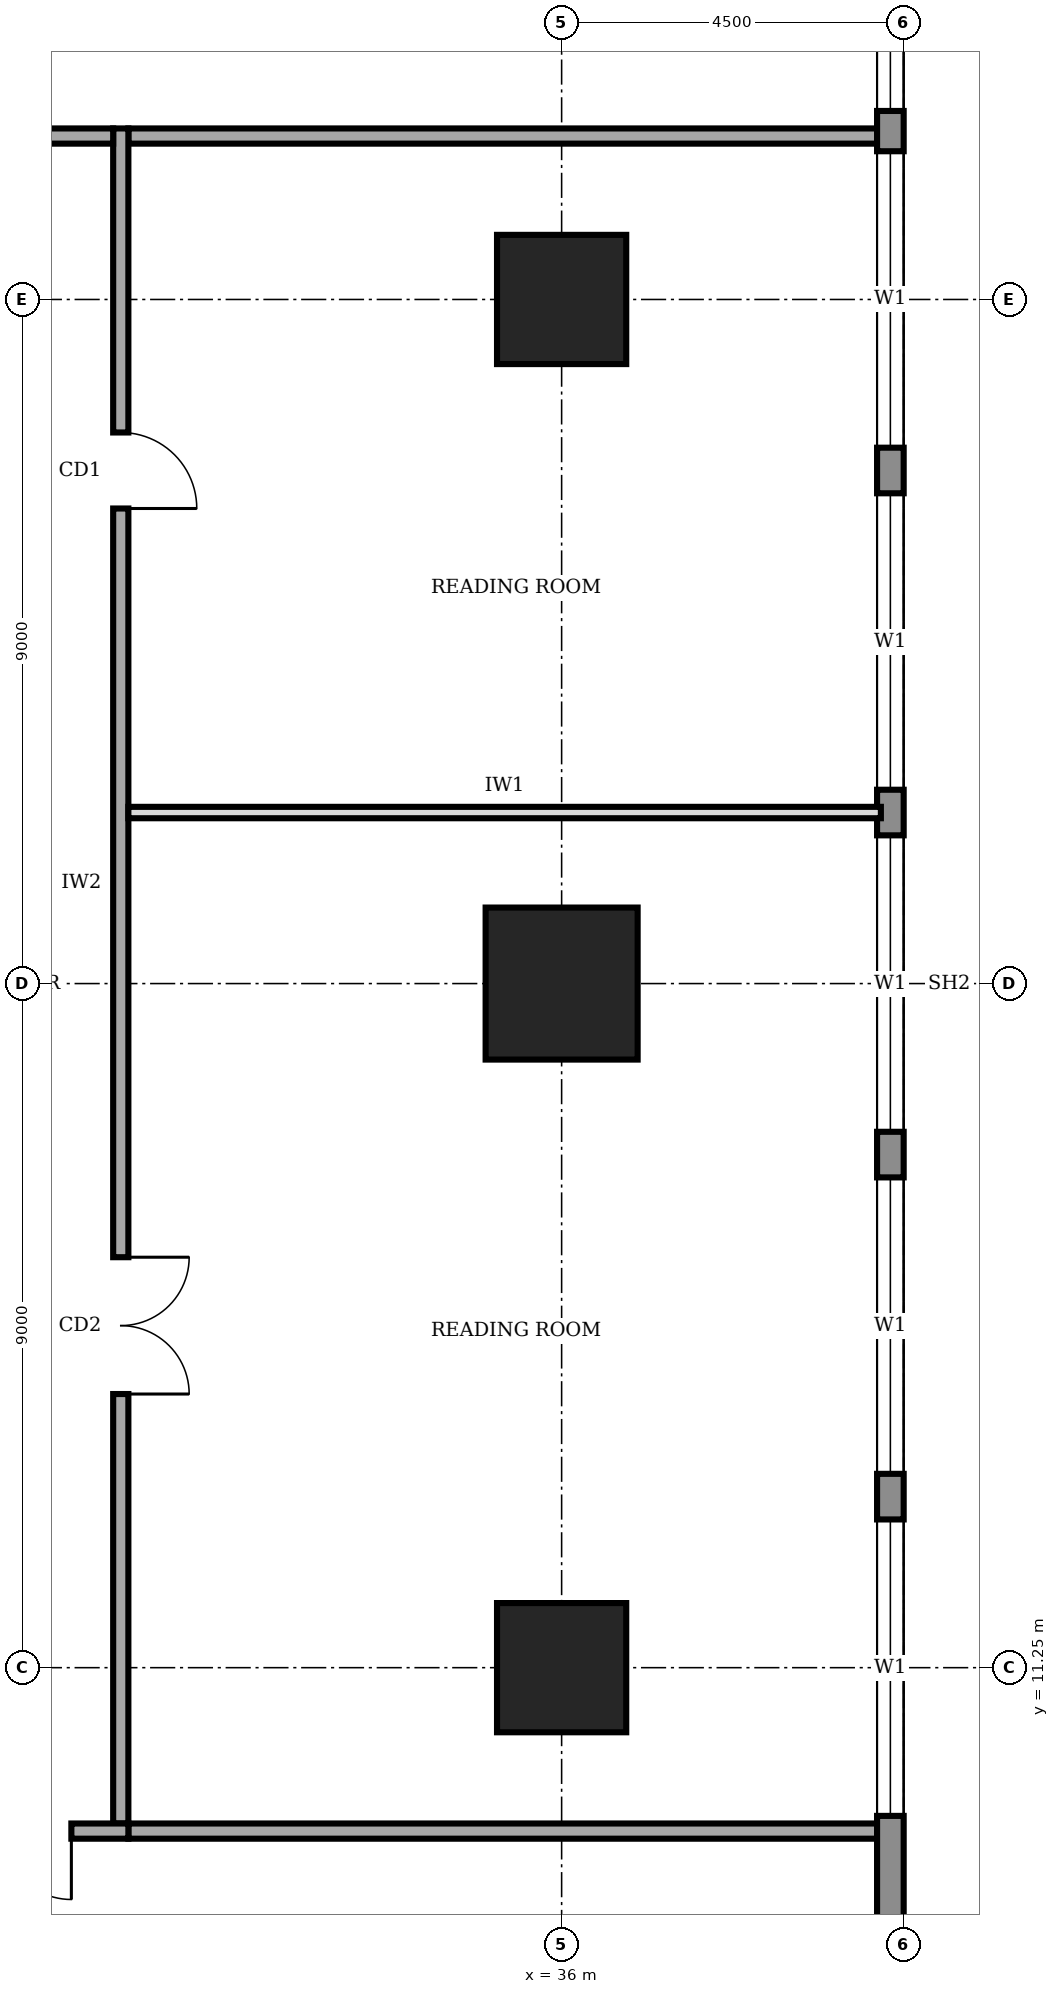
"""IFC4 building model, lengths in metres.
Left out: names, types, materials, properties, quantities, classifications, styles, units other than length and angle.
Written with IfcOpenShell. Run it as: python <this file> out.ifc"""

import sys

from ifc_helpers import new_model, si_unit, direction, frame, frame_2d, origin, origin_2d, place, context, subcontext, project, spatial, rectangle, extrude, element, fill, save


model = new_model("IFC4")
c1 = context("Model", 3, precision=1e-05, world=origin(), true_north=direction((0.0, 1.0)))
c2 = subcontext(c1, "Body", "Model", "MODEL_VIEW")
j1 = project(units=[si_unit("LENGTHUNIT", "METRE"), si_unit("PLANEANGLEUNIT", "RADIAN")], contexts=[c1])
p1 = place(None, origin())
s1 = spatial("IfcSite", under=j1, at=p1, CompositionType="ELEMENT")
p2 = place(p1, origin())
s2 = spatial("IfcBuilding", under=s1, at=p2, CompositionType="ELEMENT")
p3 = place(p2, frame((0.0, 0.0, 285.0)))
s3 = spatial("IfcBuildingStorey", under=s2, at=p3, CompositionType="ELEMENT", Elevation=285.0)
p4 = place(p3, frame((36.0, 11.25, 0.0), z_axis=(0.0, 0.0, 1.0), x_axis=(1.0, 0.0, 0.0)))
e1 = element("IfcColumn", 1, at=p4, inside=s3, PredefinedType="COLUMN", context=c2, shape_type="SweptSolid", body=[
    extrude(rectangle(XDim=1.7, YDim=1.7, at=origin_2d()), origin(), (0.0, 0.0, 1.0), 4.0),
])
p5 = place(p3, frame((36.0, 20.25, 0.0), z_axis=(0.0, 0.0, 1.0), x_axis=(1.0, 0.0, 0.0)))
e2 = element("IfcColumn", 2, at=p5, inside=s3, PredefinedType="COLUMN", context=c2, shape_type="SweptSolid", body=[
    extrude(rectangle(XDim=2.0, YDim=2.0, at=origin_2d()), origin(), (0.0, 0.0, 1.0), 4.0),
])
p6 = place(p3, frame((36.0, 29.25, 0.0), z_axis=(0.0, 0.0, 1.0), x_axis=(1.0, 0.0, 0.0)))
e3 = element("IfcColumn", 3, at=p6, inside=s3, PredefinedType="COLUMN", context=c2, shape_type="SweptSolid", body=[
    extrude(rectangle(XDim=1.7, YDim=1.7, at=origin_2d()), origin(), (0.0, 0.0, 1.0), 4.0),
])
p7 = place(p3, frame((40.325, 4.52, 0.0), z_axis=(0.0, 0.0, 1.0), x_axis=(0.0, 1.0, 0.0)))
e4 = element("IfcWall", 4, at=p7, inside=s3, PredefinedType="STANDARD", context=c2, shape_type="SweptSolid", body=[
    extrude(rectangle(XDim=31.46, YDim=0.35, at=frame_2d((15.73, 0.0))), origin(), (0.0, 0.0, 1.0), 3.75),
])
p8 = place(p7, frame((4.78, 0.0, 0.9)))
e5 = element("IfcOpeningElement", 5, at=p8, cuts=e4, PredefinedType="OPENING", context=c2, shape_type="SweptSolid", body=[
    extrude(rectangle(XDim=3.9, YDim=2.2, at=frame_2d((1.95, 1.1))), frame((0.0, 0.185, 0.0), z_axis=(0.0, -1.0, 0.0), x_axis=(1.0, 0.0, 0.0)), (0.0, 0.0, 1.0), 0.37),
])
p9 = place(p7, frame((9.28, 0.0, 0.9)))
e6 = element("IfcOpeningElement", 6, at=p9, cuts=e4, PredefinedType="OPENING", context=c2, shape_type="SweptSolid", body=[
    extrude(rectangle(XDim=3.9, YDim=2.2, at=frame_2d((1.95, 1.1))), frame((0.0, 0.185, 0.0), z_axis=(0.0, -1.0, 0.0), x_axis=(1.0, 0.0, 0.0)), (0.0, 0.0, 1.0), 0.37),
])
p10 = place(p7, frame((13.78, 0.0, 0.9)))
e7 = element("IfcOpeningElement", 7, at=p10, cuts=e4, PredefinedType="OPENING", context=c2, shape_type="SweptSolid", body=[
    extrude(rectangle(XDim=3.9, YDim=2.2, at=frame_2d((1.95, 1.1))), frame((0.0, 0.185, 0.0), z_axis=(0.0, -1.0, 0.0), x_axis=(1.0, 0.0, 0.0)), (0.0, 0.0, 1.0), 0.37),
])
p11 = place(p7, frame((18.28, 0.0, 0.9)))
e8 = element("IfcOpeningElement", 8, at=p11, cuts=e4, PredefinedType="OPENING", context=c2, shape_type="SweptSolid", body=[
    extrude(rectangle(XDim=3.9, YDim=2.2, at=frame_2d((1.95, 1.1))), frame((0.0, 0.185, 0.0), z_axis=(0.0, -1.0, 0.0), x_axis=(1.0, 0.0, 0.0)), (0.0, 0.0, 1.0), 0.37),
])
p12 = place(p7, frame((22.78, 0.0, 0.9)))
e9 = element("IfcOpeningElement", 9, at=p12, cuts=e4, PredefinedType="OPENING", context=c2, shape_type="SweptSolid", body=[
    extrude(rectangle(XDim=3.9, YDim=2.2, at=frame_2d((1.95, 1.1))), frame((0.0, 0.185, 0.0), z_axis=(0.0, -1.0, 0.0), x_axis=(1.0, 0.0, 0.0)), (0.0, 0.0, 1.0), 0.37),
])
p13 = place(p7, frame((27.21, 0.0, 0.9)))
e10 = element("IfcOpeningElement", 10, at=p13, cuts=e4, PredefinedType="OPENING", context=c2, shape_type="SweptSolid", body=[
    extrude(rectangle(XDim=3.9, YDim=2.2, at=frame_2d((1.95, 1.1))), frame((0.0, 0.185, 0.0), z_axis=(0.0, -1.0, 0.0), x_axis=(1.0, 0.0, 0.0)), (0.0, 0.0, 1.0), 0.37),
])
p14 = place(p3, frame((11.9, 9.1, 0.0), z_axis=(0.0, 0.0, 1.0), x_axis=(1.0, 0.0, 0.0)))
e11 = element("IfcWall", 11, at=p14, inside=s3, PredefinedType="SOLIDWALL", context=c2, shape_type="SweptSolid", body=[
    extrude(rectangle(XDim=18.4, YDim=0.2, at=frame_2d((9.2, 0.0))), origin(), (0.0, 0.0, 1.0), 3.75),
])
p15 = place(p14, frame((6.55, 0.0, 0.0)))
e12 = element("IfcOpeningElement", 12, at=p15, cuts=e11, PredefinedType="OPENING", context=c2, shape_type="SweptSolid", body=[
    extrude(rectangle(XDim=1.8, YDim=2.1, at=frame_2d((0.9, 1.05))), frame((0.0, 0.11, 0.0), z_axis=(0.0, -1.0, 0.0), x_axis=(1.0, 0.0, 0.0)), (0.0, 0.0, 1.0), 0.22),
])
p16 = place(p14, frame((15.85, 0.0, 0.0)))
e13 = element("IfcOpeningElement", 13, at=p16, cuts=e11, PredefinedType="OPENING", context=c2, shape_type="SweptSolid", body=[
    extrude(rectangle(XDim=1.8, YDim=2.1, at=frame_2d((0.9, 1.05))), frame((0.0, 0.11, 0.0), z_axis=(0.0, -1.0, 0.0), x_axis=(1.0, 0.0, 0.0)), (0.0, 0.0, 1.0), 0.22),
])
p17 = place(p3, frame((30.2, 9.2, 0.0), z_axis=(0.0, 0.0, 1.0), x_axis=(0.0, 1.0, 0.0)))
e14 = element("IfcWall", 14, at=p17, inside=s3, PredefinedType="SOLIDWALL", context=c2, shape_type="SweptSolid", body=[
    extrude(rectangle(XDim=22.3, YDim=0.2, at=frame_2d((11.15, 0.0))), origin(), (0.0, 0.0, 1.0), 3.75),
])
p18 = place(p17, frame((5.65, 0.0, 0.0)))
e15 = element("IfcOpeningElement", 15, at=p18, cuts=e14, PredefinedType="OPENING", context=c2, shape_type="SweptSolid", body=[
    extrude(rectangle(XDim=1.8, YDim=2.1, at=frame_2d((0.9, 1.05))), frame((0.0, 0.11, 0.0), z_axis=(0.0, -1.0, 0.0), x_axis=(1.0, 0.0, 0.0)), (0.0, 0.0, 1.0), 0.22),
])
p19 = place(p17, frame((17.3, 0.0, 0.0)))
e16 = element("IfcOpeningElement", 16, at=p19, cuts=e14, PredefinedType="OPENING", context=c2, shape_type="SweptSolid", body=[
    extrude(rectangle(XDim=1.0, YDim=2.1, at=frame_2d((0.5, 1.05))), frame((0.0, 0.11, 0.0), z_axis=(0.0, -1.0, 0.0), x_axis=(1.0, 0.0, 0.0)), (0.0, 0.0, 1.0), 0.22),
])
p20 = place(p3, frame((30.1, 31.4, 0.0), z_axis=(0.0, 0.0, 1.0), x_axis=(-1.0, 0.0, 0.0)))
e17 = element("IfcWall", 17, at=p20, inside=s3, PredefinedType="SOLIDWALL", context=c2, shape_type="SweptSolid", body=[
    extrude(rectangle(XDim=18.4, YDim=0.2, at=frame_2d((9.2, 0.0))), origin(), (0.0, 0.0, 1.0), 3.75),
])
p21 = place(p20, frame((14.35, 0.0, 0.0)))
e18 = element("IfcOpeningElement", 18, at=p21, cuts=e17, PredefinedType="OPENING", context=c2, shape_type="SweptSolid", body=[
    extrude(rectangle(XDim=1.8, YDim=2.1, at=frame_2d((0.9, 1.05))), frame((0.0, 0.11, 0.0), z_axis=(0.0, -1.0, 0.0), x_axis=(1.0, 0.0, 0.0)), (0.0, 0.0, 1.0), 0.22),
])
p22 = place(p20, frame((9.35, 0.0, 0.0)))
e19 = element("IfcOpeningElement", 19, at=p22, cuts=e17, PredefinedType="OPENING", context=c2, shape_type="SweptSolid", body=[
    extrude(rectangle(XDim=1.0, YDim=2.1, at=frame_2d((0.5, 1.05))), frame((0.0, 0.11, 0.0), z_axis=(0.0, -1.0, 0.0), x_axis=(1.0, 0.0, 0.0)), (0.0, 0.0, 1.0), 0.22),
])
p23 = place(p20, frame((2.8, 0.0, 0.0)))
e20 = element("IfcOpeningElement", 20, at=p23, cuts=e17, PredefinedType="OPENING", context=c2, shape_type="SweptSolid", body=[
    extrude(rectangle(XDim=1.8, YDim=2.1, at=frame_2d((0.9, 1.05))), frame((0.0, 0.11, 0.0), z_axis=(0.0, -1.0, 0.0), x_axis=(1.0, 0.0, 0.0)), (0.0, 0.0, 1.0), 0.22),
])
for number, where, z_axis, x_axis in (
    (21, (30.3, 9.1, 0.0), (0.0, 0.0, 1.0), (1.0, 0.0, 0.0)),
    (22, (30.3, 31.4, 0.0), (0.0, 0.0, 1.0), (1.0, 0.0, 0.0)),
):
    element("IfcWall", number, at=place(p3, frame(where, z_axis=z_axis, x_axis=x_axis)), inside=s3, PredefinedType="SOLIDWALL", context=c2, shape_type="SweptSolid", body=[
        extrude(rectangle(XDim=9.9, YDim=0.2, at=frame_2d((4.95, 0.0))), origin(), (0.0, 0.0, 1.0), 3.75),
    ])
p24 = place(p3, frame((30.3, 22.5, 0.0), z_axis=(0.0, 0.0, 1.0), x_axis=(1.0, 0.0, 0.0)))
e23 = element("IfcWall", 23, at=p24, inside=s3, PredefinedType="PARTITIONING", context=c2, shape_type="SweptSolid", body=[
    extrude(rectangle(XDim=9.9, YDim=0.15, at=frame_2d((4.95, 0.0))), origin(), (0.0, 0.0, 1.0), 3.75),
])
p25 = place(p8, origin())
e24 = element("IfcWindow", 24, at=p25, inside=s3, PartitioningType="SINGLE_PANEL", PredefinedType="WINDOW", context=c2, shape_type="SweptSolid", body=[
    extrude(rectangle(XDim=3.9, YDim=2.2, at=frame_2d((1.95, 1.1))), frame((0.0, 0.03, 0.0), z_axis=(0.0, -1.0, 0.0), x_axis=(1.0, 0.0, 0.0)), (0.0, 0.0, 1.0), 0.06),
])
fill(e5, e24)
p26 = place(p9, origin())
e25 = element("IfcWindow", 25, at=p26, inside=s3, PartitioningType="SINGLE_PANEL", PredefinedType="WINDOW", context=c2, shape_type="SweptSolid", body=[
    extrude(rectangle(XDim=3.9, YDim=2.2, at=frame_2d((1.95, 1.1))), frame((0.0, 0.03, 0.0), z_axis=(0.0, -1.0, 0.0), x_axis=(1.0, 0.0, 0.0)), (0.0, 0.0, 1.0), 0.06),
])
fill(e6, e25)
p27 = place(p10, origin())
e26 = element("IfcWindow", 26, at=p27, inside=s3, PartitioningType="SINGLE_PANEL", PredefinedType="WINDOW", context=c2, shape_type="SweptSolid", body=[
    extrude(rectangle(XDim=3.9, YDim=2.2, at=frame_2d((1.95, 1.1))), frame((0.0, 0.03, 0.0), z_axis=(0.0, -1.0, 0.0), x_axis=(1.0, 0.0, 0.0)), (0.0, 0.0, 1.0), 0.06),
])
fill(e7, e26)
p28 = place(p11, origin())
e27 = element("IfcWindow", 27, at=p28, inside=s3, PartitioningType="SINGLE_PANEL", PredefinedType="WINDOW", context=c2, shape_type="SweptSolid", body=[
    extrude(rectangle(XDim=3.9, YDim=2.2, at=frame_2d((1.95, 1.1))), frame((0.0, 0.03, 0.0), z_axis=(0.0, -1.0, 0.0), x_axis=(1.0, 0.0, 0.0)), (0.0, 0.0, 1.0), 0.06),
])
fill(e8, e27)
p29 = place(p12, origin())
e28 = element("IfcWindow", 28, at=p29, inside=s3, PartitioningType="SINGLE_PANEL", PredefinedType="WINDOW", context=c2, shape_type="SweptSolid", body=[
    extrude(rectangle(XDim=3.9, YDim=2.2, at=frame_2d((1.95, 1.1))), frame((0.0, 0.03, 0.0), z_axis=(0.0, -1.0, 0.0), x_axis=(1.0, 0.0, 0.0)), (0.0, 0.0, 1.0), 0.06),
])
fill(e9, e28)
p30 = place(p13, origin())
e29 = element("IfcWindow", 29, at=p30, inside=s3, PartitioningType="SINGLE_PANEL", PredefinedType="WINDOW", context=c2, shape_type="SweptSolid", body=[
    extrude(rectangle(XDim=3.9, YDim=2.2, at=frame_2d((1.95, 1.1))), frame((0.0, 0.03, 0.0), z_axis=(0.0, -1.0, 0.0), x_axis=(1.0, 0.0, 0.0)), (0.0, 0.0, 1.0), 0.06),
])
fill(e10, e29)
p31 = place(p16, frame((1.8, 0.0, 0.0), z_axis=(0.0, 0.0, 1.0), x_axis=(-1.0, 0.0, 0.0)))
e30 = element("IfcDoor", 30, at=p31, inside=s3, OperationType="DOUBLE_DOOR_SINGLE_SWING", PredefinedType="DOOR", context=c2, shape_type="SweptSolid", body=[
    extrude(rectangle(XDim=1.8, YDim=2.1, at=frame_2d((0.9, 1.05))), frame((0.0, 0.025, 0.0), z_axis=(0.0, -1.0, 0.0), x_axis=(1.0, 0.0, 0.0)), (0.0, 0.0, 1.0), 0.05),
])
fill(e13, e30)
p32 = place(p18, frame((1.8, 0.0, 0.0), z_axis=(0.0, 0.0, 1.0), x_axis=(-1.0, 0.0, 0.0)))
e31 = element("IfcDoor", 31, at=p32, inside=s3, OperationType="DOUBLE_DOOR_SINGLE_SWING", PredefinedType="DOOR", context=c2, shape_type="SweptSolid", body=[
    extrude(rectangle(XDim=1.8, YDim=2.1, at=frame_2d((0.9, 1.05))), frame((0.0, 0.025, 0.0), z_axis=(0.0, -1.0, 0.0), x_axis=(1.0, 0.0, 0.0)), (0.0, 0.0, 1.0), 0.05),
])
fill(e15, e31)
p33 = place(p19, frame((1.0, 0.0, 0.0), z_axis=(0.0, 0.0, 1.0), x_axis=(-1.0, 0.0, 0.0)))
e32 = element("IfcDoor", 32, at=p33, inside=s3, OperationType="SINGLE_SWING_RIGHT", PredefinedType="DOOR", context=c2, shape_type="SweptSolid", body=[
    extrude(rectangle(XDim=1.0, YDim=2.1, at=frame_2d((0.5, 1.05))), frame((0.0, 0.025, 0.0), z_axis=(0.0, -1.0, 0.0), x_axis=(1.0, 0.0, 0.0)), (0.0, 0.0, 1.0), 0.05),
])
fill(e16, e32)
save(model, sys.argv[1])
